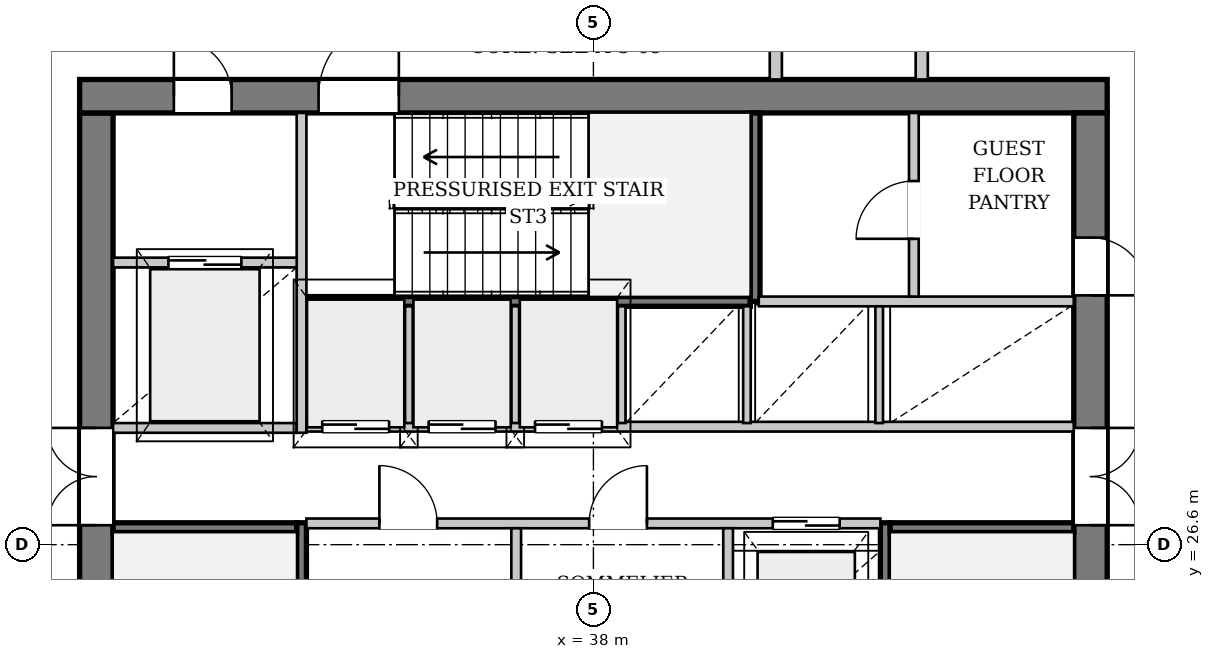
"""IFC4 building model, lengths in metres.
Left out: names, types, materials, properties, quantities, classifications, styles, units other than length and angle.
Written with IfcOpenShell. Run it as: python <this file> out.ifc"""

import sys

from ifc_helpers import new_model, si_unit, direction, frame, frame_2d, origin, place, context, subcontext, project, spatial, rectangle, extrude, source, transform, mapped, element, fill, save


model = new_model("IFC4")
c1 = context("Model", 3, precision=1e-05, world=origin(), true_north=direction((0.0, 1.0)))
c2 = subcontext(c1, "Body", "Model", "MODEL_VIEW")
j1 = project(units=[si_unit("LENGTHUNIT", "METRE"), si_unit("PLANEANGLEUNIT", "RADIAN")], contexts=[c1])
p1 = place(None, origin())
s1 = spatial("IfcSite", under=j1, at=p1, CompositionType="ELEMENT")
p2 = place(p1, origin())
s2 = spatial("IfcBuilding", under=s1, at=p2, CompositionType="ELEMENT")
p3 = place(p2, frame((0.0, 0.0, 200.3)))
s3 = spatial("IfcBuildingStorey", under=s2, at=p3, CompositionType="ELEMENT", Elevation=200.3)
p4 = place(p3, frame((15.966, 33.426, 0.0), z_axis=(0.0, 0.0, 1.0), x_axis=(0.917865013835, 0.396892701341, 0.0)))
e1 = element("IfcWall", 1, at=p4, inside=s3, PredefinedType="SOLIDWALL", context=c2, shape_type="SweptSolid", body=[
    extrude(rectangle(XDim=22.598, YDim=0.38, at=frame_2d((11.299, 0.0))), origin(), (0.0, 0.0, 1.0), 2.972),
])
p5 = place(p4, frame((5.977, 0.0, 0.602)))
e2 = element("IfcOpeningElement", 2, at=p5, cuts=e1, PredefinedType="OPENING", context=c2, shape_type="SweptSolid", body=[
    extrude(rectangle(XDim=2.2, YDim=2.25, at=frame_2d((1.1, 1.125))), frame((0.0, 0.2, 0.0), z_axis=(0.0, -1.0, 0.0), x_axis=(1.0, 0.0, 0.0)), (0.0, 0.0, 1.0), 0.4),
])
p6 = place(p4, frame((16.27, 0.0, 0.602)))
e3 = element("IfcOpeningElement", 3, at=p6, cuts=e1, PredefinedType="OPENING", context=c2, shape_type="SweptSolid", body=[
    extrude(rectangle(XDim=2.2, YDim=2.25, at=frame_2d((1.1, 1.125))), frame((0.0, 0.2, 0.0), z_axis=(0.0, -1.0, 0.0), x_axis=(1.0, 0.0, 0.0)), (0.0, 0.0, 1.0), 0.4),
])
p7 = place(p3, frame((29.825, 19.5, 0.0), z_axis=(0.0, 0.0, 1.0), x_axis=(0.0, 1.0, 0.0)))
e4 = element("IfcWall", 4, at=p7, inside=s3, PredefinedType="SHEAR", context=c2, shape_type="SweptSolid", body=[
    extrude(rectangle(XDim=14.2, YDim=0.55, at=frame_2d((7.1, 0.0))), origin(), (0.0, 0.0, 1.0), 3.58),
])
p8 = place(p7, frame((7.42, 0.0, 0.0)))
e5 = element("IfcOpeningElement", 5, at=p8, cuts=e4, PredefinedType="OPENING", context=c2, shape_type="SweptSolid", body=[
    extrude(rectangle(XDim=1.6, YDim=2.2, at=frame_2d((0.8, 1.1))), frame((0.0, 0.285, 0.0), z_axis=(0.0, -1.0, 0.0), x_axis=(1.0, 0.0, 0.0)), (0.0, 0.0, 1.0), 0.57),
])
p9 = place(p3, frame((29.55, 33.975, 0.0), z_axis=(0.0, 0.0, 1.0), x_axis=(1.0, 0.0, 0.0)))
e6 = element("IfcWall", 6, at=p9, inside=s3, PredefinedType="SHEAR", context=c2, shape_type="SweptSolid", body=[
    extrude(rectangle(XDim=16.9, YDim=0.55, at=frame_2d((8.45, 0.0))), origin(), (0.0, 0.0, 1.0), 3.58),
])
p10 = place(p9, frame((1.55, 0.0, 0.0)))
e7 = element("IfcOpeningElement", 7, at=p10, cuts=e6, PredefinedType="OPENING", context=c2, shape_type="SweptSolid", body=[
    extrude(rectangle(XDim=0.95, YDim=2.1, at=frame_2d((0.475, 1.05))), frame((0.0, 0.285, 0.0), z_axis=(0.0, -1.0, 0.0), x_axis=(1.0, 0.0, 0.0)), (0.0, 0.0, 1.0), 0.57),
])
p11 = place(p9, frame((3.93, 0.0, 0.0)))
e8 = element("IfcOpeningElement", 8, at=p11, cuts=e6, PredefinedType="OPENING", context=c2, shape_type="SweptSolid", body=[
    extrude(rectangle(XDim=1.32, YDim=2.2, at=frame_2d((0.66, 1.1))), frame((0.0, 0.285, 0.0), z_axis=(0.0, -1.0, 0.0), x_axis=(1.0, 0.0, 0.0)), (0.0, 0.0, 1.0), 0.57),
])
p12 = place(p3, frame((46.175, 33.7, 0.0), z_axis=(0.0, 0.0, 1.0), x_axis=(0.0, -1.0, 0.0)))
e9 = element("IfcWall", 9, at=p12, inside=s3, PredefinedType="SHEAR", context=c2, shape_type="SweptSolid", body=[
    extrude(rectangle(XDim=14.2, YDim=0.55, at=frame_2d((7.1, 0.0))), origin(), (0.0, 0.0, 1.0), 3.58),
])
p13 = place(p12, frame((5.18, 0.0, 0.0)))
e10 = element("IfcOpeningElement", 10, at=p13, cuts=e9, PredefinedType="OPENING", context=c2, shape_type="SweptSolid", body=[
    extrude(rectangle(XDim=1.6, YDim=2.2, at=frame_2d((0.8, 1.1))), frame((0.0, 0.285, 0.0), z_axis=(0.0, -1.0, 0.0), x_axis=(1.0, 0.0, 0.0)), (0.0, 0.0, 1.0), 0.57),
])
p14 = place(p12, frame((2.05, 0.0, 0.0)))
e11 = element("IfcOpeningElement", 11, at=p14, cuts=e9, PredefinedType="OPENING", context=c2, shape_type="SweptSolid", body=[
    extrude(rectangle(XDim=0.95, YDim=2.1, at=frame_2d((0.475, 1.05))), frame((0.0, 0.285, 0.0), z_axis=(0.0, -1.0, 0.0), x_axis=(1.0, 0.0, 0.0)), (0.0, 0.0, 1.0), 0.57),
])
p15 = place(p3, frame((33.2, 19.5, 0.0), z_axis=(0.0, 0.0, 1.0), x_axis=(0.0, 1.0, 0.0)))
e12 = element("IfcWall", 12, at=p15, inside=s3, PredefinedType="PARTITIONING", context=c2, shape_type="SweptSolid", body=[
    extrude(rectangle(XDim=7.46, YDim=0.16, at=frame_2d((3.73, 0.0))), origin(), (0.0, 0.0, 1.0), 3.58),
])
p16 = place(p15, frame((0.08, 0.0, 0.0)))
e13 = element("IfcOpeningElement", 13, at=p16, cuts=e12, PredefinedType="OPENING", context=c2, shape_type="SweptSolid", body=[
    extrude(rectangle(XDim=1.32, YDim=2.2, at=frame_2d((0.66, 1.1))), frame((0.0, 0.09, 0.0), z_axis=(0.0, -1.0, 0.0), x_axis=(1.0, 0.0, 0.0)), (0.0, 0.0, 1.0), 0.18),
])
p17 = place(p3, frame((30.1, 26.88, 0.0), z_axis=(0.0, 0.0, 1.0), x_axis=(1.0, 0.0, 0.0)))
e14 = element("IfcWall", 14, at=p17, inside=s3, PredefinedType="PARTITIONING", context=c2, shape_type="SweptSolid", body=[
    extrude(rectangle(XDim=3.02, YDim=0.16, at=frame_2d((1.51, 0.0))), origin(), (0.0, 0.0, 1.0), 3.58),
])
p18 = place(p3, frame((42.8, 26.96, 0.0), z_axis=(0.0, 0.0, 1.0), x_axis=(0.0, -1.0, 0.0)))
e15 = element("IfcWall", 15, at=p18, inside=s3, PredefinedType="PARTITIONING", context=c2, shape_type="SweptSolid", body=[
    extrude(rectangle(XDim=7.46, YDim=0.16, at=frame_2d((3.73, 0.0))), origin(), (0.0, 0.0, 1.0), 3.58),
])
p19 = place(p18, frame((6.06, 0.0, 0.0)))
e16 = element("IfcOpeningElement", 16, at=p19, cuts=e15, PredefinedType="OPENING", context=c2, shape_type="SweptSolid", body=[
    extrude(rectangle(XDim=1.32, YDim=2.2, at=frame_2d((0.66, 1.1))), frame((0.0, 0.09, 0.0), z_axis=(0.0, -1.0, 0.0), x_axis=(1.0, 0.0, 0.0)), (0.0, 0.0, 1.0), 0.18),
])
p20 = place(p3, frame((42.88, 26.88, 0.0), z_axis=(0.0, 0.0, 1.0), x_axis=(1.0, 0.0, 0.0)))
e17 = element("IfcWall", 17, at=p20, inside=s3, PredefinedType="PARTITIONING", context=c2, shape_type="SweptSolid", body=[
    extrude(rectangle(XDim=3.02, YDim=0.16, at=frame_2d((1.51, 0.0))), origin(), (0.0, 0.0, 1.0), 3.58),
])
p21 = place(p3, frame((33.28, 30.6, 0.0), z_axis=(0.0, 0.0, 1.0), x_axis=(1.0, 0.0, 0.0)))
e18 = element("IfcWall", 18, at=p21, inside=s3, PredefinedType="PARTITIONING", context=c2, shape_type="SweptSolid", body=[
    extrude(rectangle(XDim=7.3, YDim=0.16, at=frame_2d((3.65, 0.0))), origin(), (0.0, 0.0, 1.0), 3.58),
])
p22 = place(p3, frame((40.66, 30.6, 0.0), z_axis=(0.0, 0.0, 1.0), x_axis=(0.0, 1.0, 0.0)))
e19 = element("IfcWall", 19, at=p22, inside=s3, PredefinedType="PARTITIONING", context=c2, shape_type="SweptSolid", body=[
    extrude(rectangle(XDim=3.1, YDim=0.16, at=frame_2d((1.55, 0.0))), origin(), (0.0, 0.0, 1.0), 3.58),
])
p23 = place(p3, frame((30.1, 28.52, 0.0), z_axis=(0.0, 0.0, 1.0), x_axis=(1.0, 0.0, 0.0)))
e20 = element("IfcWall", 20, at=p23, inside=s3, PredefinedType="PARTITIONING", context=c2, shape_type="SweptSolid", body=[
    extrude(rectangle(XDim=3.02, YDim=0.16, at=frame_2d((1.51, 0.0))), origin(), (0.0, 0.0, 1.0), 3.58),
])
p24 = place(p3, frame((33.2, 28.44, 0.0), z_axis=(0.0, 0.0, 1.0), x_axis=(0.0, 1.0, 0.0)))
e21 = element("IfcWall", 21, at=p24, inside=s3, PredefinedType="PARTITIONING", context=c2, shape_type="SweptSolid", body=[
    extrude(rectangle(XDim=5.26, YDim=0.16, at=frame_2d((2.63, 0.0))), origin(), (0.0, 0.0, 1.0), 3.58),
])
p25 = place(p3, frame((30.1, 31.24, 0.0), z_axis=(0.0, 0.0, 1.0), x_axis=(1.0, 0.0, 0.0)))
e22 = element("IfcWall", 22, at=p25, inside=s3, PredefinedType="PARTITIONING", context=c2, shape_type="SweptSolid", body=[
    extrude(rectangle(XDim=3.02, YDim=0.16, at=frame_2d((1.51, 0.0))), origin(), (0.0, 0.0, 1.0), 3.58),
])
p26 = place(p25, frame((0.91, 0.0, 0.0)))
e23 = element("IfcOpeningElement", 23, at=p26, cuts=e22, PredefinedType="OPENING", context=c2, shape_type="SweptSolid", body=[
    extrude(rectangle(XDim=1.2, YDim=2.2, at=frame_2d((0.6, 1.1))), frame((0.0, 0.09, 0.0), z_axis=(0.0, -1.0, 0.0), x_axis=(1.0, 0.0, 0.0)), (0.0, 0.0, 1.0), 0.18),
])
p27 = place(p3, frame((33.28, 26.95, 0.0), z_axis=(0.0, 0.0, 1.0), x_axis=(1.0, 0.0, 0.0)))
e24 = element("IfcWall", 24, at=p27, inside=s3, PredefinedType="PARTITIONING", context=c2, shape_type="SweptSolid", body=[
    extrude(rectangle(XDim=9.44, YDim=0.16, at=frame_2d((4.72, 0.0))), origin(), (0.0, 0.0, 1.0), 3.58),
])
p28 = place(p27, frame((1.2, 0.0, 0.0)))
e25 = element("IfcOpeningElement", 25, at=p28, cuts=e24, PredefinedType="OPENING", context=c2, shape_type="SweptSolid", body=[
    extrude(rectangle(XDim=0.95, YDim=2.1, at=frame_2d((0.475, 1.05))), frame((0.0, 0.09, 0.0), z_axis=(0.0, -1.0, 0.0), x_axis=(1.0, 0.0, 0.0)), (0.0, 0.0, 1.0), 0.18),
])
p29 = place(p27, frame((4.65, 0.0, 0.0)))
e26 = element("IfcOpeningElement", 26, at=p29, cuts=e24, PredefinedType="OPENING", context=c2, shape_type="SweptSolid", body=[
    extrude(rectangle(XDim=0.95, YDim=2.1, at=frame_2d((0.475, 1.05))), frame((0.0, 0.09, 0.0), z_axis=(0.0, -1.0, 0.0), x_axis=(1.0, 0.0, 0.0)), (0.0, 0.0, 1.0), 0.18),
])
p30 = place(p27, frame((7.67, 0.0, 0.0)))
e27 = element("IfcOpeningElement", 27, at=p30, cuts=e24, PredefinedType="OPENING", context=c2, shape_type="SweptSolid", body=[
    extrude(rectangle(XDim=1.1, YDim=2.2, at=frame_2d((0.55, 1.1))), frame((0.0, 0.09, 0.0), z_axis=(0.0, -1.0, 0.0), x_axis=(1.0, 0.0, 0.0)), (0.0, 0.0, 1.0), 0.18),
])
for number, where, z_axis, x_axis in (
    (28, (36.73, 24.56, 0.0), (0.0, 0.0, 1.0), (0.0, 1.0, 0.0)),
    (29, (40.215, 24.56, 0.0), (0.0, 0.0, 1.0), (0.0, 1.0, 0.0)),
):
    element("IfcWall", number, at=place(p3, frame(where, z_axis=z_axis, x_axis=x_axis)), inside=s3, PredefinedType="PARTITIONING", context=c2, shape_type="SweptSolid", body=[
        extrude(rectangle(XDim=2.31, YDim=0.16, at=frame_2d((1.155, 0.0))), origin(), (0.0, 0.0, 1.0), 3.58),
    ])
p31 = place(p3, frame((33.28, 28.54, 0.0), z_axis=(0.0, 0.0, 1.0), x_axis=(1.0, 0.0, 0.0)))
e30 = element("IfcWall", 30, at=p31, inside=s3, PredefinedType="PARTITIONING", context=c2, shape_type="SweptSolid", body=[
    extrude(rectangle(XDim=12.62, YDim=0.16, at=frame_2d((6.31, 0.0))), origin(), (0.0, 0.0, 1.0), 3.58),
])
p32 = place(p31, frame((0.26, 0.0, 0.0)))
e31 = element("IfcOpeningElement", 31, at=p32, cuts=e30, PredefinedType="OPENING", context=c2, shape_type="SweptSolid", body=[
    extrude(rectangle(XDim=1.1, YDim=2.2, at=frame_2d((0.55, 1.1))), frame((0.0, 0.09, 0.0), z_axis=(0.0, -1.0, 0.0), x_axis=(1.0, 0.0, 0.0)), (0.0, 0.0, 1.0), 0.18),
])
p33 = place(p31, frame((2.01, 0.0, 0.0)))
e32 = element("IfcOpeningElement", 32, at=p33, cuts=e30, PredefinedType="OPENING", context=c2, shape_type="SweptSolid", body=[
    extrude(rectangle(XDim=1.1, YDim=2.2, at=frame_2d((0.55, 1.1))), frame((0.0, 0.09, 0.0), z_axis=(0.0, -1.0, 0.0), x_axis=(1.0, 0.0, 0.0)), (0.0, 0.0, 1.0), 0.18),
])
p34 = place(p31, frame((3.76, 0.0, 0.0)))
e33 = element("IfcOpeningElement", 33, at=p34, cuts=e30, PredefinedType="OPENING", context=c2, shape_type="SweptSolid", body=[
    extrude(rectangle(XDim=1.1, YDim=2.2, at=frame_2d((0.55, 1.1))), frame((0.0, 0.09, 0.0), z_axis=(0.0, -1.0, 0.0), x_axis=(1.0, 0.0, 0.0)), (0.0, 0.0, 1.0), 0.18),
])
p35 = place(p3, frame((40.72, 30.6, 0.0), z_axis=(0.0, 0.0, 1.0), x_axis=(1.0, 0.0, 0.0)))
e34 = element("IfcWall", 34, at=p35, inside=s3, PredefinedType="PARTITIONING", context=c2, shape_type="SweptSolid", body=[
    extrude(rectangle(XDim=5.18, YDim=0.16, at=frame_2d((2.59, 0.0))), origin(), (0.0, 0.0, 1.0), 3.58),
])
for number, where, z_axis, x_axis in (
    (35, (34.965, 28.6, 0.0), (0.0, 0.0, 1.0), (0.0, 1.0, 0.0)),
    (36, (36.715, 28.6, 0.0), (0.0, 0.0, 1.0), (0.0, 1.0, 0.0)),
    (37, (38.465, 28.6, 0.0), (0.0, 0.0, 1.0), (0.0, 1.0, 0.0)),
    (38, (40.525, 28.6, 0.0), (0.0, 0.0, 1.0), (0.0, 1.0, 0.0)),
    (39, (42.7, 28.6, 0.0), (0.0, 0.0, 1.0), (0.0, 1.0, 0.0)),
):
    element("IfcWall", number, at=place(p3, frame(where, z_axis=z_axis, x_axis=x_axis)), inside=s3, PredefinedType="PARTITIONING", context=c2, shape_type="SweptSolid", body=[
        extrude(rectangle(XDim=1.92, YDim=0.125, at=frame_2d((0.96, 0.0))), origin(), (0.0, 0.0, 1.0), 3.58),
    ])
p36 = place(p3, frame((43.27, 30.68, 0.0), z_axis=(0.0, 0.0, 1.0), x_axis=(0.0, 1.0, 0.0)))
e40 = element("IfcWall", 40, at=p36, inside=s3, PredefinedType="PARTITIONING", context=c2, shape_type="SweptSolid", body=[
    extrude(rectangle(XDim=3.02, YDim=0.16, at=frame_2d((1.51, 0.0))), origin(), (0.0, 0.0, 1.0), 3.58),
])
p37 = place(p36, frame((0.95, 0.0, 0.0)))
e41 = element("IfcOpeningElement", 41, at=p37, cuts=e40, PredefinedType="OPENING", context=c2, shape_type="SweptSolid", body=[
    extrude(rectangle(XDim=0.95, YDim=2.1, at=frame_2d((0.475, 1.05))), frame((0.0, 0.09, 0.0), z_axis=(0.0, -1.0, 0.0), x_axis=(1.0, 0.0, 0.0)), (0.0, 0.0, 1.0), 0.18),
])
for number, where, z_axis, x_axis in (
    (42, (41.0, 34.25, 0.0), (0.0, 0.0, 1.0), (0.0, 1.0, 0.0)),
    (43, (43.4, 34.25, 0.0), (0.0, 0.0, 1.0), (0.0, 1.0, 0.0)),
):
    element("IfcWall", number, at=place(p3, frame(where, z_axis=z_axis, x_axis=x_axis)), inside=s3, PredefinedType="PARTITIONING", context=c2, shape_type="SweptSolid", body=[
        extrude(rectangle(XDim=1.95, YDim=0.2, at=frame_2d((0.975, 0.0))), origin(), (0.0, 0.0, 1.0), 3.58),
    ])
m1 = source(origin(), c2, "Body", "SweptSolid", [
    extrude(rectangle(XDim=1.6, YDim=2.2, at=frame_2d((0.8, 1.1))), frame((0.0, 0.025, 0.0), z_axis=(0.0, -1.0, 0.0), x_axis=(1.0, 0.0, 0.0)), (0.0, 0.0, 1.0), 0.05),
])
p38 = place(p8, origin())
e44 = element("IfcDoor", 44, at=p38, inside=s3, OperationType="DOUBLE_DOOR_SINGLE_SWING", PredefinedType="DOOR", context=c2, shape_type="MappedRepresentation", body=[
    mapped(m1, transform((0.0, 0.0, 0.0), x_axis=(1.0, 0.0, 0.0), y_axis=(0.0, 1.0, 0.0), z_axis=(0.0, 0.0, 1.0), scale=1.0)),
])
fill(e5, e44)
m2 = source(origin(), c2, "Body", "SweptSolid", [
    extrude(rectangle(XDim=0.95, YDim=2.1, at=frame_2d((0.475, 1.05))), frame((0.0, 0.025, 0.0), z_axis=(0.0, -1.0, 0.0), x_axis=(1.0, 0.0, 0.0)), (0.0, 0.0, 1.0), 0.05),
])
p39 = place(p10, origin())
e45 = element("IfcDoor", 45, at=p39, inside=s3, OperationType="SINGLE_SWING_LEFT", PredefinedType="DOOR", context=c2, shape_type="MappedRepresentation", body=[
    mapped(m2, transform((0.0, 0.0, 0.0), x_axis=(1.0, 0.0, 0.0), y_axis=(0.0, 1.0, 0.0), z_axis=(0.0, 0.0, 1.0), scale=1.0)),
])
fill(e7, e45)
m3 = source(origin(), c2, "Body", "SweptSolid", [
    extrude(rectangle(XDim=1.32, YDim=2.2, at=frame_2d((0.66, 1.1))), frame((0.0, 0.025, 0.0), z_axis=(0.0, -1.0, 0.0), x_axis=(1.0, 0.0, 0.0)), (0.0, 0.0, 1.0), 0.05),
])
p40 = place(p11, origin())
e46 = element("IfcDoor", 46, at=p40, inside=s3, OperationType="SINGLE_SWING_RIGHT", PredefinedType="DOOR", context=c2, shape_type="MappedRepresentation", body=[
    mapped(m3, transform((0.0, 0.0, 0.0), x_axis=(1.0, 0.0, 0.0), y_axis=(0.0, 1.0, 0.0), z_axis=(0.0, 0.0, 1.0), scale=1.0)),
])
fill(e8, e46)
p41 = place(p13, origin())
e47 = element("IfcDoor", 47, at=p41, inside=s3, OperationType="DOUBLE_DOOR_SINGLE_SWING", PredefinedType="DOOR", context=c2, shape_type="MappedRepresentation", body=[
    mapped(m1, transform((0.0, 0.0, 0.0), x_axis=(1.0, 0.0, 0.0), y_axis=(0.0, 1.0, 0.0), z_axis=(0.0, 0.0, 1.0), scale=1.0)),
])
fill(e10, e47)
m4 = source(origin(), c2, "Body", "SweptSolid", [
    extrude(rectangle(XDim=1.2, YDim=2.2, at=frame_2d((0.6, 1.1))), frame((0.0, 0.025, 0.0), z_axis=(0.0, -1.0, 0.0), x_axis=(1.0, 0.0, 0.0)), (0.0, 0.0, 1.0), 0.05),
])
p42 = place(p26, origin())
e48 = element("IfcDoor", 48, at=p42, inside=s3, OperationType="DOUBLE_DOOR_SLIDING", PredefinedType="DOOR", context=c2, shape_type="MappedRepresentation", body=[
    mapped(m4, transform((0.0, 0.0, 0.0), x_axis=(1.0, 0.0, 0.0), y_axis=(0.0, 1.0, 0.0), z_axis=(0.0, 0.0, 1.0), scale=1.0)),
])
fill(e23, e48)
p43 = place(p28, origin())
e49 = element("IfcDoor", 49, at=p43, inside=s3, OperationType="SINGLE_SWING_LEFT", PredefinedType="DOOR", context=c2, shape_type="MappedRepresentation", body=[
    mapped(m2, transform((0.0, 0.0, 0.0), x_axis=(1.0, 0.0, 0.0), y_axis=(0.0, 1.0, 0.0), z_axis=(0.0, 0.0, 1.0), scale=1.0)),
])
fill(e25, e49)
p44 = place(p29, origin())
e50 = element("IfcDoor", 50, at=p44, inside=s3, OperationType="SINGLE_SWING_RIGHT", PredefinedType="DOOR", context=c2, shape_type="MappedRepresentation", body=[
    mapped(m2, transform((0.0, 0.0, 0.0), x_axis=(1.0, 0.0, 0.0), y_axis=(0.0, 1.0, 0.0), z_axis=(0.0, 0.0, 1.0), scale=1.0)),
])
fill(e26, e50)
m5 = source(origin(), c2, "Body", "SweptSolid", [
    extrude(rectangle(XDim=1.1, YDim=2.2, at=frame_2d((0.55, 1.1))), frame((0.0, 0.025, 0.0), z_axis=(0.0, -1.0, 0.0), x_axis=(1.0, 0.0, 0.0)), (0.0, 0.0, 1.0), 0.05),
])
p45 = place(p30, origin())
e51 = element("IfcDoor", 51, at=p45, inside=s3, OperationType="DOUBLE_DOOR_SLIDING", PredefinedType="DOOR", context=c2, shape_type="MappedRepresentation", body=[
    mapped(m5, transform((0.0, 0.0, 0.0), x_axis=(1.0, 0.0, 0.0), y_axis=(0.0, 1.0, 0.0), z_axis=(0.0, 0.0, 1.0), scale=1.0)),
])
fill(e27, e51)
p46 = place(p32, origin())
e52 = element("IfcDoor", 52, at=p46, inside=s3, OperationType="DOUBLE_DOOR_SLIDING", PredefinedType="DOOR", context=c2, shape_type="MappedRepresentation", body=[
    mapped(m5, transform((0.0, 0.0, 0.0), x_axis=(1.0, 0.0, 0.0), y_axis=(0.0, 1.0, 0.0), z_axis=(0.0, 0.0, 1.0), scale=1.0)),
])
fill(e31, e52)
p47 = place(p33, origin())
e53 = element("IfcDoor", 53, at=p47, inside=s3, OperationType="DOUBLE_DOOR_SLIDING", PredefinedType="DOOR", context=c2, shape_type="MappedRepresentation", body=[
    mapped(m5, transform((0.0, 0.0, 0.0), x_axis=(1.0, 0.0, 0.0), y_axis=(0.0, 1.0, 0.0), z_axis=(0.0, 0.0, 1.0), scale=1.0)),
])
fill(e32, e53)
p48 = place(p34, origin())
e54 = element("IfcDoor", 54, at=p48, inside=s3, OperationType="DOUBLE_DOOR_SLIDING", PredefinedType="DOOR", context=c2, shape_type="MappedRepresentation", body=[
    mapped(m5, transform((0.0, 0.0, 0.0), x_axis=(1.0, 0.0, 0.0), y_axis=(0.0, 1.0, 0.0), z_axis=(0.0, 0.0, 1.0), scale=1.0)),
])
fill(e33, e54)
p49 = place(p37, origin())
e55 = element("IfcDoor", 55, at=p49, inside=s3, OperationType="SINGLE_SWING_LEFT", PredefinedType="DOOR", context=c2, shape_type="MappedRepresentation", body=[
    mapped(m2, transform((0.0, 0.0, 0.0), x_axis=(1.0, 0.0, 0.0), y_axis=(0.0, 1.0, 0.0), z_axis=(0.0, 0.0, 1.0), scale=1.0)),
])
fill(e41, e55)
p50 = place(p14, origin())
e56 = element("IfcDoor", 56, at=p50, inside=s3, OperationType="SINGLE_SWING_RIGHT", PredefinedType="DOOR", context=c2, shape_type="MappedRepresentation", body=[
    mapped(m2, transform((0.0, 0.0, 0.0), x_axis=(1.0, 0.0, 0.0), y_axis=(0.0, 1.0, 0.0), z_axis=(0.0, 0.0, 1.0), scale=1.0)),
])
fill(e11, e56)
save(model, sys.argv[1])
